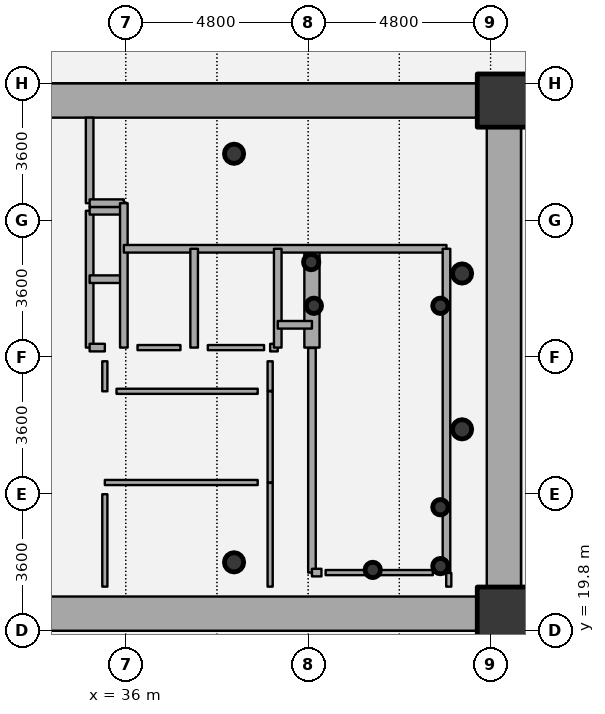
"""IFC4 building model, lengths in metres.
Left out: names, types, materials, properties, quantities, classifications, styles, units other than length and angle.
Written with IfcOpenShell. Run it as: python <this file> out.ifc"""

import sys

from ifc_helpers import new_model, si_unit, direction, frame, frame_2d, origin, origin_2d, place, context, subcontext, project, spatial, rectangle, hollow_circle, extrude, source, transform, mapped, element, fill, save


model = new_model("IFC4")
c1 = context("Model", 3, precision=1e-05, world=origin(), true_north=direction((0.0, 1.0)))
c2 = subcontext(c1, "Body", "Model", "MODEL_VIEW")
j1 = project(units=[si_unit("LENGTHUNIT", "METRE"), si_unit("PLANEANGLEUNIT", "RADIAN")], contexts=[c1])
p1 = place(None, origin())
s1 = spatial("IfcSite", under=j1, at=p1, CompositionType="ELEMENT")
p2 = place(p1, origin())
s2 = spatial("IfcBuilding", under=s1, at=p2, CompositionType="ELEMENT")
p3 = place(p2, frame((0.0, 0.0, -9.0)))
s3 = spatial("IfcBuildingStorey", under=s2, at=p3, CompositionType="ELEMENT", Elevation=-9.0)
for number, where, z_axis, x_axis in (
    (1, (45.95, 20.25, 0.0), (0.0, 0.0, 1.0), (1.0, 0.0, 0.0)),
    (2, (45.95, 33.75, 0.0), (0.0, 0.0, 1.0), (1.0, 0.0, 0.0)),
):
    element("IfcColumn", number, at=place(p3, frame(where, z_axis=z_axis, x_axis=x_axis)), inside=s3, PredefinedType="COLUMN", context=c2, shape_type="SweptSolid", body=[
        extrude(rectangle(XDim=1.4, YDim=1.4, at=origin_2d()), origin(), (0.0, 0.0, 1.0), 4.5),
    ])
for number, where, z_axis, x_axis in (
    (3, (38.85, 21.6, 0.0), (0.0, 0.0, 1.0), (1.0, 0.0, 0.0)),
    (4, (38.85, 32.35, 0.0), (0.0, 0.0, 1.0), (1.0, 0.0, 0.0)),
):
    element("IfcColumn", number, at=place(p3, frame(where, z_axis=z_axis, x_axis=x_axis)), inside=s3, PredefinedType="COLUMN", context=c2, shape_type="SweptSolid", body=[
        extrude(hollow_circle(Radius=0.254, WallThickness=0.02, at=origin_2d()), origin(), (0.0, 0.0, 1.0), 4.5),
    ])
for number, where, z_axis, x_axis in (
    (5, (44.28, 21.5, 0.0), (0.0, 0.0, 1.0), (1.0, 0.0, 0.0)),
    (6, (44.28, 23.05, 0.0), (0.0, 0.0, 1.0), (1.0, 0.0, 0.0)),
    (7, (42.5, 21.4, 0.0), (0.0, 0.0, 1.0), (1.0, 0.0, 0.0)),
    (8, (40.95, 28.35, 0.0), (0.0, 0.0, 1.0), (1.0, 0.0, 0.0)),
    (9, (44.28, 28.35, 0.0), (0.0, 0.0, 1.0), (1.0, 0.0, 0.0)),
    (10, (40.88, 29.5, 0.0), (0.0, 0.0, 1.0), (1.0, 0.0, 0.0)),
):
    element("IfcColumn", number, at=place(p3, frame(where, z_axis=z_axis, x_axis=x_axis)), inside=s3, PredefinedType="COLUMN", context=c2, shape_type="SweptSolid", body=[
        extrude(hollow_circle(Radius=0.203, WallThickness=0.016, at=origin_2d()), origin(), (0.0, 0.0, 1.0), 4.5),
    ])
p4 = place(p3, frame((26.75, 33.75, 0.0), z_axis=(0.0, 0.0, 1.0), x_axis=(1.0, 0.0, 0.0)))
e11 = element("IfcWall", 11, at=p4, inside=s3, PredefinedType="SHEAR", context=c2, shape_type="SweptSolid", body=[
    extrude(rectangle(XDim=18.5, YDim=0.9, at=frame_2d((9.25, 0.0))), origin(), (0.0, 0.0, 1.0), 3.65),
])
p5 = place(p3, frame((45.95, 33.05, 0.0), z_axis=(0.0, 0.0, 1.0), x_axis=(0.0, -1.0, 0.0)))
e12 = element("IfcWall", 12, at=p5, inside=s3, PredefinedType="SHEAR", context=c2, shape_type="SweptSolid", body=[
    extrude(rectangle(XDim=12.1, YDim=0.9, at=frame_2d((6.05, 0.0))), origin(), (0.0, 0.0, 1.0), 3.65),
])
p6 = place(p5, frame((5.64, 0.0, 0.0)))
e13 = element("IfcOpeningElement", 13, at=p6, cuts=e12, PredefinedType="OPENING", context=c2, shape_type="SweptSolid", body=[
    extrude(rectangle(XDim=0.82, YDim=2.1, at=origin_2d()), frame((0.41, 0.46, 1.05), z_axis=(0.0, -1.0, 0.0), x_axis=(1.0, 0.0, 0.0)), (0.0, 0.0, 1.0), 0.92),
])
p7 = place(p3, frame((45.25, 20.25, 0.0), z_axis=(0.0, 0.0, 1.0), x_axis=(-1.0, 0.0, 0.0)))
e14 = element("IfcWall", 14, at=p7, inside=s3, PredefinedType="SHEAR", context=c2, shape_type="SweptSolid", body=[
    extrude(rectangle(XDim=18.5, YDim=0.9, at=frame_2d((9.25, 0.0))), origin(), (0.0, 0.0, 1.0), 3.65),
])
p8 = place(p7, frame((10.0, 0.0, 0.0)))
e15 = element("IfcOpeningElement", 15, at=p8, cuts=e14, PredefinedType="OPENING", context=c2, shape_type="SweptSolid", body=[
    extrude(rectangle(XDim=1.15, YDim=2.15, at=origin_2d()), frame((0.575, 0.46, 1.075), z_axis=(0.0, -1.0, 0.0), x_axis=(1.0, 0.0, 0.0)), (0.0, 0.0, 1.0), 0.92),
])
p9 = place(p3, frame((40.9, 27.25, 0.0), z_axis=(0.0, 0.0, 1.0), x_axis=(0.0, 1.0, 0.0)))
e16 = element("IfcWall", 16, at=p9, inside=s3, PredefinedType="SHEAR", context=c2, shape_type="SweptSolid", body=[
    extrude(rectangle(XDim=2.6, YDim=0.4, at=frame_2d((1.3, 0.0))), origin(), (0.0, 0.0, 1.0), 3.8),
])
for number, where, z_axis, x_axis in (
    (17, (44.85, 25.1, 0.0), (0.0, 0.0, 1.0), (1.0, 0.0, 0.0)),
    (18, (44.85, 29.2, 0.0), (0.0, 0.0, 1.0), (1.0, 0.0, 0.0)),
):
    element("IfcColumn", number, at=place(p3, frame(where, z_axis=z_axis, x_axis=x_axis)), inside=s3, PredefinedType="COLUMN", context=c2, shape_type="SweptSolid", body=[
        extrude(hollow_circle(Radius=0.254, WallThickness=0.02, at=origin_2d()), origin(), (0.0, 0.0, 1.0), 4.5),
    ])
p10 = place(p3, frame((35.05, 27.25, 0.0), z_axis=(0.0, 0.0, 1.0), x_axis=(0.0, 1.0, 0.0)))
e19 = element("IfcWall", 19, at=p10, inside=s3, PredefinedType="PARTITIONING", context=c2, shape_type="SweptSolid", body=[
    extrude(rectangle(XDim=3.6, YDim=0.2, at=frame_2d((1.8, 0.0))), origin(), (0.0, 0.0, 1.0), 4.2),
])
p11 = place(p10, frame((0.59, 0.0, 0.0)))
e20 = element("IfcOpeningElement", 20, at=p11, cuts=e19, PredefinedType="OPENING", context=c2, shape_type="SweptSolid", body=[
    extrude(rectangle(XDim=0.66, YDim=2.05, at=origin_2d()), frame((0.33, 0.11, 1.025), z_axis=(0.0, -1.0, 0.0), x_axis=(1.0, 0.0, 0.0)), (0.0, 0.0, 1.0), 0.22),
])
p12 = place(p10, frame((2.35, 0.0, 0.0)))
e21 = element("IfcOpeningElement", 21, at=p12, cuts=e19, PredefinedType="OPENING", context=c2, shape_type="SweptSolid", body=[
    extrude(rectangle(XDim=0.66, YDim=2.05, at=origin_2d()), frame((0.33, 0.11, 1.025), z_axis=(0.0, -1.0, 0.0), x_axis=(1.0, 0.0, 0.0)), (0.0, 0.0, 1.0), 0.22),
])
p13 = place(p3, frame((35.05, 27.25, 0.0), z_axis=(0.0, 0.0, 1.0), x_axis=(1.0, 0.0, 0.0)))
e22 = element("IfcWall", 22, at=p13, inside=s3, PredefinedType="PARTITIONING", context=c2, shape_type="SweptSolid", body=[
    extrude(rectangle(XDim=0.4, YDim=0.2, at=frame_2d((0.2, 0.0))), origin(), (0.0, 0.0, 1.0), 4.2),
])
for number, where, z_axis, x_axis in (
    (23, (35.05, 29.05, 0.0), (0.0, 0.0, 1.0), (1.0, 0.0, 0.0)),
    (24, (35.05, 30.85, 0.0), (0.0, 0.0, 1.0), (1.0, 0.0, 0.0)),
):
    element("IfcWall", number, at=place(p3, frame(where, z_axis=z_axis, x_axis=x_axis)), inside=s3, PredefinedType="PARTITIONING", context=c2, shape_type="SweptSolid", body=[
        extrude(rectangle(XDim=0.9, YDim=0.2, at=frame_2d((0.45, 0.0))), origin(), (0.0, 0.0, 1.0), 4.2),
    ])
p14 = place(p3, frame((35.05, 31.05, 0.0), z_axis=(0.0, 0.0, 1.0), x_axis=(0.0, 1.0, 0.0)))
e25 = element("IfcWall", 25, at=p14, inside=s3, PredefinedType="PARTITIONING", context=c2, shape_type="SweptSolid", body=[
    extrude(rectangle(XDim=2.25, YDim=0.2, at=frame_2d((1.125, 0.0))), origin(), (0.0, 0.0, 1.0), 3.785),
])
p15 = place(p3, frame((35.05, 31.05, 0.0), z_axis=(0.0, 0.0, 1.0), x_axis=(1.0, 0.0, 0.0)))
e26 = element("IfcWall", 26, at=p15, inside=s3, PredefinedType="PARTITIONING", context=c2, shape_type="SweptSolid", body=[
    extrude(rectangle(XDim=0.9, YDim=0.2, at=frame_2d((0.45, 0.0))), origin(), (0.0, 0.0, 1.0), 4.2),
])
p16 = place(p3, frame((35.95, 27.25, 0.0), z_axis=(0.0, 0.0, 1.0), x_axis=(0.0, 1.0, 0.0)))
e27 = element("IfcWall", 27, at=p16, inside=s3, PredefinedType="PARTITIONING", context=c2, shape_type="SweptSolid", body=[
    extrude(rectangle(XDim=3.8, YDim=0.2, at=frame_2d((1.9, 0.0))), origin(), (0.0, 0.0, 1.0), 4.2),
])
p17 = place(p3, frame((35.95, 29.85, 0.0), z_axis=(0.0, 0.0, 1.0), x_axis=(1.0, 0.0, 0.0)))
e28 = element("IfcWall", 28, at=p17, inside=s3, PredefinedType="PARTITIONING", context=c2, shape_type="SweptSolid", body=[
    extrude(rectangle(XDim=8.49, YDim=0.2, at=frame_2d((4.245, 0.0))), origin(), (0.0, 0.0, 1.0), 3.785),
])
p18 = place(p17, frame((6.1, 0.0, 0.0)))
e29 = element("IfcOpeningElement", 29, at=p18, cuts=e28, PredefinedType="OPENING", context=c2, shape_type="SweptSolid", body=[
    extrude(rectangle(XDim=1.2, YDim=2.15, at=origin_2d()), frame((0.6, 0.11, 1.075), z_axis=(0.0, -1.0, 0.0), x_axis=(1.0, 0.0, 0.0)), (0.0, 0.0, 1.0), 0.22),
])
p19 = place(p17, frame((0.37, 0.0, 0.0)))
e30 = element("IfcOpeningElement", 30, at=p19, cuts=e28, PredefinedType="OPENING", context=c2, shape_type="SweptSolid", body=[
    extrude(rectangle(XDim=1.15, YDim=2.15, at=origin_2d()), frame((0.575, 0.11, 1.075), z_axis=(0.0, -1.0, 0.0), x_axis=(1.0, 0.0, 0.0)), (0.0, 0.0, 1.0), 0.22),
])
p20 = place(p17, frame((2.425, 0.0, 0.0)))
e31 = element("IfcOpeningElement", 31, at=p20, cuts=e28, PredefinedType="OPENING", context=c2, shape_type="SweptSolid", body=[
    extrude(rectangle(XDim=1.05, YDim=2.15, at=origin_2d()), frame((0.525, 0.11, 1.075), z_axis=(0.0, -1.0, 0.0), x_axis=(1.0, 0.0, 0.0)), (0.0, 0.0, 1.0), 0.22),
])
p21 = place(p3, frame((37.8, 27.25, 0.0), z_axis=(0.0, 0.0, 1.0), x_axis=(0.0, 1.0, 0.0)))
e32 = element("IfcWall", 32, at=p21, inside=s3, PredefinedType="PARTITIONING", context=c2, shape_type="SweptSolid", body=[
    extrude(rectangle(XDim=2.6, YDim=0.2, at=frame_2d((1.3, 0.0))), origin(), (0.0, 0.0, 1.0), 4.2),
])
p22 = place(p3, frame((39.8, 23.7, 0.0), z_axis=(0.0, 0.0, 1.0), x_axis=(0.0, 1.0, 0.0)))
e33 = element("IfcWall", 33, at=p22, inside=s3, PredefinedType="PARTITIONING", context=c2, shape_type="SweptSolid", body=[
    extrude(rectangle(XDim=2.4, YDim=0.135, at=frame_2d((1.2, 0.0))), origin(), (0.0, 0.0, 1.0), 4.2),
])
p23 = place(p22, frame((0.79, 0.0, 0.0)))
e34 = element("IfcOpeningElement", 34, at=p23, cuts=e33, PredefinedType="OPENING", context=c2, shape_type="SweptSolid", body=[
    extrude(rectangle(XDim=0.82, YDim=2.1, at=origin_2d()), frame((0.41, 0.078, 1.05), z_axis=(0.0, -1.0, 0.0), x_axis=(1.0, 0.0, 0.0)), (0.0, 0.0, 1.0), 0.155),
])
p24 = place(p3, frame((39.8, 27.25, 0.0), z_axis=(0.0, 0.0, 1.0), x_axis=(1.0, 0.0, 0.0)))
e35 = element("IfcWall", 35, at=p24, inside=s3, PredefinedType="PARTITIONING", context=c2, shape_type="SweptSolid", body=[
    extrude(rectangle(XDim=0.2, YDim=0.2, at=frame_2d((0.1, 0.0))), origin(), (0.0, 0.0, 1.0), 4.2),
])
p25 = place(p3, frame((40.0, 27.25, 0.0), z_axis=(0.0, 0.0, 1.0), x_axis=(0.0, 1.0, 0.0)))
e36 = element("IfcWall", 36, at=p25, inside=s3, PredefinedType="PARTITIONING", context=c2, shape_type="SweptSolid", body=[
    extrude(rectangle(XDim=2.6, YDim=0.2, at=frame_2d((1.3, 0.0))), origin(), (0.0, 0.0, 1.0), 4.2),
])
p26 = place(p3, frame((40.0, 27.85, 0.0), z_axis=(0.0, 0.0, 1.0), x_axis=(1.0, 0.0, 0.0)))
e37 = element("IfcWall", 37, at=p26, inside=s3, PredefinedType="PARTITIONING", context=c2, shape_type="SweptSolid", body=[
    extrude(rectangle(XDim=0.9, YDim=0.2, at=frame_2d((0.45, 0.0))), origin(), (0.0, 0.0, 1.0), 4.2),
])
p27 = place(p3, frame((40.9, 21.33, 0.0), z_axis=(0.0, 0.0, 1.0), x_axis=(0.0, 1.0, 0.0)))
e38 = element("IfcWall", 38, at=p27, inside=s3, PredefinedType="PARTITIONING", context=c2, shape_type="SweptSolid", body=[
    extrude(rectangle(XDim=5.91, YDim=0.2, at=frame_2d((2.955, 0.0))), origin(), (0.0, 0.0, 1.0), 3.735),
])
p28 = place(p3, frame((40.9, 21.33, 0.0), z_axis=(0.0, 0.0, 1.0), x_axis=(1.0, 0.0, 0.0)))
e39 = element("IfcWall", 39, at=p28, inside=s3, PredefinedType="PARTITIONING", context=c2, shape_type="SweptSolid", body=[
    extrude(rectangle(XDim=0.25, YDim=0.2, at=frame_2d((0.125, 0.0))), origin(), (0.0, 0.0, 1.0), 3.735),
])
p29 = place(p3, frame((44.44, 21.33, 0.0), z_axis=(0.0, 0.0, 1.0), x_axis=(0.0, 1.0, 0.0)))
e40 = element("IfcWall", 40, at=p29, inside=s3, PredefinedType="PARTITIONING", context=c2, shape_type="SweptSolid", body=[
    extrude(rectangle(XDim=8.52, YDim=0.2, at=frame_2d((4.26, 0.0))), origin(), (0.0, 0.0, 1.0), 4.2),
])
p30 = place(p3, frame((44.08, 21.33, 0.0), z_axis=(0.0, 0.0, 1.0), x_axis=(-1.0, 0.0, 0.0)))
e41 = element("IfcWall", 41, at=p30, inside=s3, PredefinedType="PARTITIONING", context=c2, shape_type="SweptSolid", body=[
    extrude(rectangle(XDim=2.82, YDim=0.135, at=frame_2d((1.41, 0.0))), origin(), (0.0, 0.0, 1.0), 3.735),
])
p31 = place(p3, frame((37.44, 27.25, 0.0), z_axis=(0.0, 0.0, 1.0), x_axis=(-1.0, 0.0, 0.0)))
e42 = element("IfcWall", 42, at=p31, inside=s3, PredefinedType="PARTITIONING", context=c2, shape_type="SweptSolid", body=[
    extrude(rectangle(XDim=1.13, YDim=0.135, at=frame_2d((0.565, 0.0))), origin(), (0.0, 0.0, 1.0), 4.2),
])
p32 = place(p3, frame((39.64, 27.25, 0.0), z_axis=(0.0, 0.0, 1.0), x_axis=(-1.0, 0.0, 0.0)))
e43 = element("IfcWall", 43, at=p32, inside=s3, PredefinedType="PARTITIONING", context=c2, shape_type="SweptSolid", body=[
    extrude(rectangle(XDim=1.48, YDim=0.135, at=frame_2d((0.74, 0.0))), origin(), (0.0, 0.0, 1.0), 3.785),
])
p33 = place(p3, frame((39.8, 20.96, 0.0), z_axis=(0.0, 0.0, 1.0), x_axis=(0.0, 1.0, 0.0)))
e44 = element("IfcWall", 44, at=p33, inside=s3, PredefinedType="PARTITIONING", context=c2, shape_type="SweptSolid", body=[
    extrude(rectangle(XDim=2.73, YDim=0.135, at=frame_2d((1.365, 0.0))), origin(), (0.0, 0.0, 1.0), 3.735),
])
p34 = place(p3, frame((39.8, 26.11, 0.0), z_axis=(0.0, 0.0, 1.0), x_axis=(0.0, 1.0, 0.0)))
e45 = element("IfcWall", 45, at=p34, inside=s3, PredefinedType="PARTITIONING", context=c2, shape_type="SweptSolid", body=[
    extrude(rectangle(XDim=0.78, YDim=0.135, at=frame_2d((0.39, 0.0))), origin(), (0.0, 0.0, 1.0), 4.2),
])
p35 = place(p3, frame((44.5, 20.96, 0.0), z_axis=(0.0, 0.0, 1.0), x_axis=(0.0, 1.0, 0.0)))
e46 = element("IfcWall", 46, at=p35, inside=s3, PredefinedType="PARTITIONING", context=c2, shape_type="SweptSolid", body=[
    extrude(rectangle(XDim=0.36, YDim=0.135, at=frame_2d((0.18, 0.0))), origin(), (0.0, 0.0, 1.0), 4.2),
])
p36 = place(p3, frame((35.45, 26.89, 0.0), z_axis=(0.0, 0.0, 1.0), x_axis=(0.0, -1.0, 0.0)))
e47 = element("IfcWall", 47, at=p36, inside=s3, PredefinedType="PARTITIONING", context=c2, shape_type="SweptSolid", body=[
    extrude(rectangle(XDim=0.79, YDim=0.135, at=frame_2d((0.395, 0.0))), origin(), (0.0, 0.0, 1.0), 4.2),
])
p37 = place(p3, frame((35.758, 26.1, 0.0), z_axis=(0.0, 0.0, 1.0), x_axis=(1.0, 0.0, 0.0)))
e48 = element("IfcWall", 48, at=p37, inside=s3, PredefinedType="PARTITIONING", context=c2, shape_type="SweptSolid", body=[
    extrude(rectangle(XDim=3.715, YDim=0.135, at=frame_2d((1.857, 0.0))), origin(), (0.0, 0.0, 1.0), 3.785),
])
p38 = place(p3, frame((39.472, 23.7, 0.0), z_axis=(0.0, 0.0, 1.0), x_axis=(-1.0, 0.0, 0.0)))
e49 = element("IfcWall", 49, at=p38, inside=s3, PredefinedType="PARTITIONING", context=c2, shape_type="SweptSolid", body=[
    extrude(rectangle(XDim=4.022, YDim=0.135, at=frame_2d((2.011, 0.0))), origin(), (0.0, 0.0, 1.0), 3.785),
])
p39 = place(p3, frame((35.45, 23.393, 0.0), z_axis=(0.0, 0.0, 1.0), x_axis=(0.0, -1.0, 0.0)))
e50 = element("IfcWall", 50, at=p39, inside=s3, PredefinedType="PARTITIONING", context=c2, shape_type="SweptSolid", body=[
    extrude(rectangle(XDim=2.433, YDim=0.135, at=frame_2d((1.216, 0.0))), origin(), (0.0, 0.0, 1.0), 3.785),
])
m1 = source(origin(), c2, "Body", "SweptSolid", [
    extrude(rectangle(XDim=0.82, YDim=2.1, at=origin_2d()), frame((0.41, 0.025, 1.05), z_axis=(0.0, -1.0, 0.0), x_axis=(1.0, 0.0, 0.0)), (0.0, 0.0, 1.0), 0.05),
])
p40 = place(p6, origin())
e51 = element("IfcDoor", 51, at=p40, inside=s3, OperationType="SINGLE_SWING_LEFT", PredefinedType="DOOR", context=c2, shape_type="MappedRepresentation", body=[
    mapped(m1, transform((0.0, 0.0, 0.0), x_axis=(1.0, 0.0, 0.0), y_axis=(0.0, 1.0, 0.0), z_axis=(0.0, 0.0, 1.0), scale=1.0)),
])
fill(e13, e51)
m2 = source(origin(), c2, "Body", "SweptSolid", [
    extrude(rectangle(XDim=1.15, YDim=2.15, at=origin_2d()), frame((0.575, 0.025, 1.075), z_axis=(0.0, -1.0, 0.0), x_axis=(1.0, 0.0, 0.0)), (0.0, 0.0, 1.0), 0.05),
])
p41 = place(p8, origin())
e52 = element("IfcDoor", 52, at=p41, inside=s3, OperationType="SINGLE_SWING_RIGHT", PredefinedType="DOOR", context=c2, shape_type="MappedRepresentation", body=[
    mapped(m2, transform((0.0, 0.0, 0.0), x_axis=(1.0, 0.0, 0.0), y_axis=(0.0, 1.0, 0.0), z_axis=(0.0, 0.0, 1.0), scale=1.0)),
])
fill(e15, e52)
m3 = source(origin(), c2, "Body", "SweptSolid", [
    extrude(rectangle(XDim=1.2, YDim=2.15, at=origin_2d()), frame((0.6, 0.025, 1.075), z_axis=(0.0, -1.0, 0.0), x_axis=(1.0, 0.0, 0.0)), (0.0, 0.0, 1.0), 0.05),
])
p42 = place(p18, origin())
e53 = element("IfcDoor", 53, at=p42, inside=s3, OperationType="SINGLE_SWING_RIGHT", PredefinedType="DOOR", context=c2, shape_type="MappedRepresentation", body=[
    mapped(m3, transform((0.0, 0.0, 0.0), x_axis=(1.0, 0.0, 0.0), y_axis=(0.0, 1.0, 0.0), z_axis=(0.0, 0.0, 1.0), scale=1.0)),
])
fill(e29, e53)
m4 = source(origin(), c2, "Body", "SweptSolid", [
    extrude(rectangle(XDim=1.15, YDim=2.15, at=origin_2d()), frame((0.575, 0.025, 1.075), z_axis=(0.0, -1.0, 0.0), x_axis=(1.0, 0.0, 0.0)), (0.0, 0.0, 1.0), 0.05),
])
p43 = place(p19, origin())
e54 = element("IfcDoor", 54, at=p43, inside=s3, OperationType="DOUBLE_DOOR_SLIDING", PredefinedType="USERDEFINED", context=c2, shape_type="MappedRepresentation", body=[
    mapped(m4, transform((0.0, 0.0, 0.0), x_axis=(1.0, 0.0, 0.0), y_axis=(0.0, 1.0, 0.0), z_axis=(0.0, 0.0, 1.0), scale=1.0)),
])
fill(e30, e54)
m5 = source(origin(), c2, "Body", "SweptSolid", [
    extrude(rectangle(XDim=1.05, YDim=2.15, at=origin_2d()), frame((0.525, 0.025, 1.075), z_axis=(0.0, -1.0, 0.0), x_axis=(1.0, 0.0, 0.0)), (0.0, 0.0, 1.0), 0.05),
])
p44 = place(p20, origin())
e55 = element("IfcDoor", 55, at=p44, inside=s3, OperationType="DOUBLE_DOOR_SLIDING", PredefinedType="USERDEFINED", context=c2, shape_type="MappedRepresentation", body=[
    mapped(m5, transform((0.0, 0.0, 0.0), x_axis=(1.0, 0.0, 0.0), y_axis=(0.0, 1.0, 0.0), z_axis=(0.0, 0.0, 1.0), scale=1.0)),
])
fill(e31, e55)
m6 = source(origin(), c2, "Body", "SweptSolid", [
    extrude(rectangle(XDim=0.66, YDim=2.05, at=origin_2d()), frame((0.33, 0.025, 1.025), z_axis=(0.0, -1.0, 0.0), x_axis=(1.0, 0.0, 0.0)), (0.0, 0.0, 1.0), 0.05),
])
p45 = place(p11, origin())
e56 = element("IfcDoor", 56, at=p45, inside=s3, OperationType="SINGLE_SWING_RIGHT", PredefinedType="USERDEFINED", context=c2, shape_type="MappedRepresentation", body=[
    mapped(m6, transform((0.0, 0.0, 0.0), x_axis=(1.0, 0.0, 0.0), y_axis=(0.0, 1.0, 0.0), z_axis=(0.0, 0.0, 1.0), scale=1.0)),
])
fill(e20, e56)
p46 = place(p12, origin())
e57 = element("IfcDoor", 57, at=p46, inside=s3, OperationType="SINGLE_SWING_LEFT", PredefinedType="USERDEFINED", context=c2, shape_type="MappedRepresentation", body=[
    mapped(m6, transform((0.0, 0.0, 0.0), x_axis=(1.0, 0.0, 0.0), y_axis=(0.0, 1.0, 0.0), z_axis=(0.0, 0.0, 1.0), scale=1.0)),
])
fill(e21, e57)
p47 = place(p23, origin())
e58 = element("IfcDoor", 58, at=p47, inside=s3, OperationType="SINGLE_SWING_RIGHT", PredefinedType="DOOR", context=c2, shape_type="MappedRepresentation", body=[
    mapped(m1, transform((0.0, 0.0, 0.0), x_axis=(1.0, 0.0, 0.0), y_axis=(0.0, 1.0, 0.0), z_axis=(0.0, 0.0, 1.0), scale=1.0)),
])
fill(e34, e58)
save(model, sys.argv[1])
